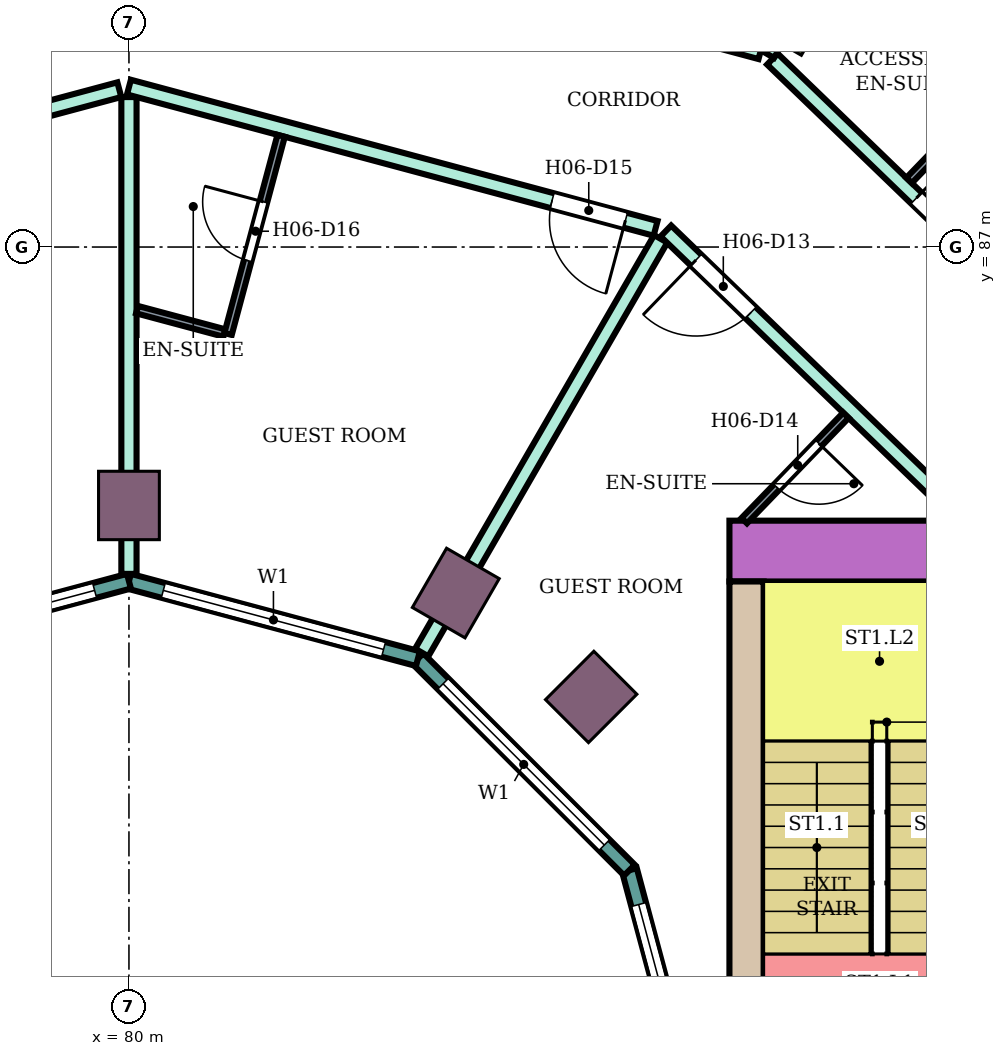
"""IFC4 building model, lengths in metres.
Left out: names, types, materials, properties, quantities, classifications, styles, units other than length and angle.
Written with IfcOpenShell. Run it as: python <this file> out.ifc"""

import sys

from ifc_helpers import new_model, si_unit, direction, frame, frame_2d, origin, origin_2d, place, context, subcontext, project, spatial, rectangle, extrude, element, fill, save


model = new_model("IFC4")
c1 = context("Model", 3, precision=1e-05, world=origin(), true_north=direction((0.0, 1.0)))
c2 = subcontext(c1, "Body", "Model", "MODEL_VIEW")
j1 = project(units=[si_unit("LENGTHUNIT", "METRE"), si_unit("PLANEANGLEUNIT", "RADIAN")], contexts=[c1])
p1 = place(None, origin())
s1 = spatial("IfcSite", under=j1, at=p1, CompositionType="ELEMENT")
p2 = place(p1, origin())
s2 = spatial("IfcBuilding", under=s1, at=p2, CompositionType="ELEMENT")
p3 = place(p2, frame((0.0, 0.0, 97.6)))
s3 = spatial("IfcBuildingStorey", under=s2, at=p3, CompositionType="ELEMENT", Elevation=97.6)
p4 = place(p3, frame((88.8, 90.242, 0.0), z_axis=(0.0, 0.0, 1.0), x_axis=(0.5, 0.866025403784, 0.0)))
e1 = element("IfcColumn", 1, at=p4, inside=s3, PredefinedType="COLUMN", context=c2, shape_type="SweptSolid", body=[
    extrude(rectangle(XDim=1.2, YDim=0.8, at=origin_2d()), origin(), (0.0, 0.0, 1.0), 3.8),
])
for number, where, z_axis, x_axis in (
    (2, (86.081, 81.081, 0.0), (0.0, 0.0, 1.0), (0.707, 0.707, 0.0)),
    (3, (84.3, 82.448, 0.0), (0.0, 0.0, 1.0), (0.5, 0.866, 0.0)),
    (4, (80.0, 83.6, 0.0), (0.0, 0.0, 1.0), (0.0, 1.0, 0.0)),
):
    element("IfcColumn", number, at=place(p3, frame(where, z_axis=z_axis, x_axis=x_axis)), inside=s3, PredefinedType="COLUMN", context=c2, shape_type="SweptSolid", body=[
        extrude(rectangle(XDim=0.9, YDim=0.8, at=origin_2d()), origin(), (0.0, 0.0, 1.0), 3.8),
    ])
p5 = place(p3, frame((87.9, 83.0, 0.0), z_axis=(0.0, 0.0, 1.0), x_axis=(1.0, 0.0, 0.0)))
e5 = element("IfcWall", 5, at=p5, inside=s3, PredefinedType="SHEAR", context=c2, shape_type="SweptSolid", body=[
    extrude(rectangle(XDim=14.7, YDim=0.8, at=frame_2d((7.35, 0.0))), origin(), (0.0, 0.0, 1.0), 3.48),
])
p6 = place(p5, frame((4.2, 0.0, 0.0)))
e6 = element("IfcOpeningElement", 6, at=p6, cuts=e5, PredefinedType="OPENING", context=c2, shape_type="SweptSolid", body=[
    extrude(rectangle(XDim=2.4, YDim=2.4, at=frame_2d((1.2, 1.2))), frame((0.0, 0.41, 0.0), z_axis=(0.0, -1.0, 0.0), x_axis=(1.0, 0.0, 0.0)), (0.0, 0.0, 1.0), 0.82),
])
p7 = place(p3, frame((88.125, 75.0, 0.0), z_axis=(0.0, 0.0, 1.0), x_axis=(0.0, 1.0, 0.0)))
e7 = element("IfcWall", 7, at=p7, inside=s3, PredefinedType="SHEAR", context=c2, shape_type="SweptSolid", body=[
    extrude(rectangle(XDim=7.6, YDim=0.45, at=frame_2d((3.8, 0.0))), origin(), (0.0, 0.0, 1.0), 3.48),
])
p8 = place(p3, frame((87.604, 75.0, 0.0), z_axis=(0.0, 0.0, 1.0), x_axis=(-0.258789828301, 0.965933654434, 0.0)))
e8 = element("IfcWall", 8, at=p8, inside=s3, PredefinedType="NOTDEFINED", context=c2, shape_type="SweptSolid", body=[
    extrude(rectangle(XDim=3.936, YDim=0.2, at=frame_2d((1.968, 0.0))), origin(), (0.0, 0.0, 1.0), 3.8),
])
p9 = place(p8, frame((0.468, 0.0, 0.9)))
e9 = element("IfcOpeningElement", 9, at=p9, cuts=e8, PredefinedType="OPENING", context=c2, shape_type="SweptSolid", body=[
    extrude(rectangle(XDim=3.0, YDim=2.3, at=frame_2d((1.5, 1.15))), frame((0.0, 0.11, 0.0), z_axis=(0.0, -1.0, 0.0), x_axis=(1.0, 0.0, 0.0)), (0.0, 0.0, 1.0), 0.22),
])
p10 = place(p3, frame((86.585, 78.802, 0.0), z_axis=(0.0, 0.0, 1.0), x_axis=(-0.707106781187, 0.707106781187, 0.0)))
e10 = element("IfcWall", 10, at=p10, inside=s3, PredefinedType="NOTDEFINED", context=c2, shape_type="SweptSolid", body=[
    extrude(rectangle(XDim=3.936, YDim=0.2, at=frame_2d((1.968, 0.0))), origin(), (0.0, 0.0, 1.0), 3.8),
])
p11 = place(p10, frame((0.468, 0.0, 0.9)))
e11 = element("IfcOpeningElement", 11, at=p11, cuts=e10, PredefinedType="OPENING", context=c2, shape_type="SweptSolid", body=[
    extrude(rectangle(XDim=3.0, YDim=2.3, at=frame_2d((1.5, 1.15))), frame((0.0, 0.11, 0.0), z_axis=(0.0, -1.0, 0.0), x_axis=(1.0, 0.0, 0.0)), (0.0, 0.0, 1.0), 0.22),
])
p12 = place(p3, frame((83.802, 81.585, 0.0), z_axis=(0.0, 0.0, 1.0), x_axis=(-0.965933654434, 0.258789828301, 0.0)))
e12 = element("IfcWall", 12, at=p12, inside=s3, PredefinedType="NOTDEFINED", context=c2, shape_type="SweptSolid", body=[
    extrude(rectangle(XDim=3.936, YDim=0.2, at=frame_2d((1.968, 0.0))), origin(), (0.0, 0.0, 1.0), 3.8),
])
p13 = place(p12, frame((0.468, 0.0, 0.9)))
e13 = element("IfcOpeningElement", 13, at=p13, cuts=e12, PredefinedType="OPENING", context=c2, shape_type="SweptSolid", body=[
    extrude(rectangle(XDim=3.0, YDim=2.3, at=frame_2d((1.5, 1.15))), frame((0.0, 0.11, 0.0), z_axis=(0.0, -1.0, 0.0), x_axis=(1.0, 0.0, 0.0)), (0.0, 0.0, 1.0), 0.22),
])
p14 = place(p3, frame((80.0, 82.604, 0.0), z_axis=(0.0, 0.0, 1.0), x_axis=(-0.965933654434, -0.258789828301, 0.0)))
e14 = element("IfcWall", 14, at=p14, inside=s3, PredefinedType="NOTDEFINED", context=c2, shape_type="SweptSolid", body=[
    extrude(rectangle(XDim=3.936, YDim=0.2, at=frame_2d((1.968, 0.0))), origin(), (0.0, 0.0, 1.0), 3.8),
])
p15 = place(p14, frame((0.468, 0.0, 0.9)))
e15 = element("IfcOpeningElement", 15, at=p15, cuts=e14, PredefinedType="OPENING", context=c2, shape_type="SweptSolid", body=[
    extrude(rectangle(XDim=3.0, YDim=2.3, at=frame_2d((1.5, 1.15))), frame((0.0, 0.11, 0.0), z_axis=(0.0, -1.0, 0.0), x_axis=(1.0, 0.0, 0.0)), (0.0, 0.0, 1.0), 0.22),
])
p16 = place(p3, frame((71.614, 89.55, 0.0), z_axis=(0.0, 0.0, 1.0), x_axis=(0.965982378603, 0.258607896685, 0.0)))
e16 = element("IfcWall", 16, at=p16, inside=s3, PredefinedType="PARTITIONING", context=c2, shape_type="SweptSolid", body=[
    extrude(rectangle(XDim=8.632, YDim=0.2, at=frame_2d((4.316, 0.0))), origin(), (0.0, 0.0, 1.0), 3.35),
])
p17 = place(p16, frame((2.804, 0.0, 0.0)))
e17 = element("IfcOpeningElement", 17, at=p17, cuts=e16, PredefinedType="OPENING", context=c2, shape_type="SweptSolid", body=[
    extrude(rectangle(XDim=1.0, YDim=2.1, at=frame_2d((0.5, 1.05))), frame((0.0, 0.11, 0.0), z_axis=(0.0, -1.0, 0.0), x_axis=(1.0, 0.0, 0.0)), (0.0, 0.0, 1.0), 0.22),
])
p18 = place(p3, frame((72.936, 87.211, 0.0), z_axis=(0.0, 0.0, 1.0), x_axis=(0.965917703859, 0.258849356521, 0.0)))
e18 = element("IfcWall", 18, at=p18, inside=s3, PredefinedType="PARTITIONING", context=c2, shape_type="SweptSolid", body=[
    extrude(rectangle(XDim=7.182, YDim=0.2, at=frame_2d((3.591, 0.0))), origin(), (0.0, 0.0, 1.0), 3.35),
])
p19 = place(p18, frame((2.757, 0.0, 0.0)))
e19 = element("IfcOpeningElement", 19, at=p19, cuts=e18, PredefinedType="OPENING", context=c2, shape_type="SweptSolid", body=[
    extrude(rectangle(XDim=1.8, YDim=2.1, at=frame_2d((0.9, 1.05))), frame((0.0, 0.11, 0.0), z_axis=(0.0, -1.0, 0.0), x_axis=(1.0, 0.0, 0.0)), (0.0, 0.0, 1.0), 0.22),
])
p20 = place(p3, frame((80.0, 82.7, 0.0), z_axis=(0.0, 0.0, 1.0), x_axis=(0.0, 1.0, 0.0)))
e20 = element("IfcWall", 20, at=p20, inside=s3, PredefinedType="PARTITIONING", context=c2, shape_type="SweptSolid", body=[
    extrude(rectangle(XDim=6.273, YDim=0.2, at=frame_2d((3.136, 0.0))), origin(), (0.0, 0.0, 1.0), 3.35),
])
p21 = place(p3, frame((80.0, 89.104, 0.0), z_axis=(0.0, 0.0, 1.0), x_axis=(0.965856548257, -0.259077455964, 0.0)))
e21 = element("IfcWall", 21, at=p21, inside=s3, PredefinedType="PARTITIONING", context=c2, shape_type="SweptSolid", body=[
    extrude(rectangle(XDim=7.173, YDim=0.2, at=frame_2d((3.586, 0.0))), origin(), (0.0, 0.0, 1.0), 3.35),
])
p22 = place(p21, frame((5.763, 0.0, 0.0)))
e22 = element("IfcOpeningElement", 22, at=p22, cuts=e21, PredefinedType="OPENING", context=c2, shape_type="SweptSolid", body=[
    extrude(rectangle(XDim=1.0, YDim=2.1, at=frame_2d((0.5, 1.05))), frame((0.0, 0.11, 0.0), z_axis=(0.0, -1.0, 0.0), x_axis=(1.0, 0.0, 0.0)), (0.0, 0.0, 1.0), 0.22),
])
p23 = place(p3, frame((80.0, 91.796, 0.0), z_axis=(0.0, 0.0, 1.0), x_axis=(0.965917643923, -0.258849580177, 0.0)))
e23 = element("IfcWall", 23, at=p23, inside=s3, PredefinedType="PARTITIONING", context=c2, shape_type="SweptSolid", body=[
    extrude(rectangle(XDim=8.602, YDim=0.2, at=frame_2d((4.301, 0.0))), origin(), (0.0, 0.0, 1.0), 3.35),
])
p24 = place(p23, frame((2.091, 0.0, 0.0)))
e24 = element("IfcOpeningElement", 24, at=p24, cuts=e23, PredefinedType="OPENING", context=c2, shape_type="SweptSolid", body=[
    extrude(rectangle(XDim=1.8, YDim=2.1, at=frame_2d((0.9, 1.05))), frame((0.0, 0.11, 0.0), z_axis=(0.0, -1.0, 0.0), x_axis=(1.0, 0.0, 0.0)), (0.0, 0.0, 1.0), 0.22),
])
p25 = place(p3, frame((83.852, 81.665, 0.0), z_axis=(0.0, 0.0, 1.0), x_axis=(0.500236829077, 0.86588862727, 0.0)))
e25 = element("IfcWall", 25, at=p25, inside=s3, PredefinedType="PARTITIONING", context=c2, shape_type="SweptSolid", body=[
    extrude(rectangle(XDim=6.286, YDim=0.2, at=frame_2d((3.143, 0.0))), origin(), (0.0, 0.0, 1.0), 3.35),
])
p26 = place(p3, frame((87.064, 87.211, 0.0), z_axis=(0.0, 0.0, 1.0), x_axis=(0.719540958932, -0.694450004262, 0.0)))
e26 = element("IfcWall", 26, at=p26, inside=s3, PredefinedType="PARTITIONING", context=c2, shape_type="SweptSolid", body=[
    extrude(rectangle(XDim=5.488, YDim=0.2, at=frame_2d((2.744, 0.0))), origin(), (0.0, 0.0, 1.0), 3.35),
])
p27 = place(p26, frame((0.55, 0.0, 0.0)))
e27 = element("IfcOpeningElement", 27, at=p27, cuts=e26, PredefinedType="OPENING", context=c2, shape_type="SweptSolid", body=[
    extrude(rectangle(XDim=1.0, YDim=2.1, at=frame_2d((0.5, 1.05))), frame((0.0, 0.11, 0.0), z_axis=(0.0, -1.0, 0.0), x_axis=(1.0, 0.0, 0.0)), (0.0, 0.0, 1.0), 0.22),
])
p28 = place(p3, frame((88.465, 89.473, 0.0), z_axis=(0.0, 0.0, 1.0), x_axis=(0.719474304909, -0.694519059908, 0.0)))
e28 = element("IfcWall", 28, at=p28, inside=s3, PredefinedType="PARTITIONING", context=c2, shape_type="SweptSolid", body=[
    extrude(rectangle(XDim=6.525, YDim=0.2, at=frame_2d((3.263, 0.0))), origin(), (0.0, 0.0, 1.0), 3.35),
])
p29 = place(p28, frame((2.633, 0.0, 0.0)))
e29 = element("IfcOpeningElement", 29, at=p29, cuts=e28, PredefinedType="OPENING", context=c2, shape_type="SweptSolid", body=[
    extrude(rectangle(XDim=1.1, YDim=2.1, at=frame_2d((0.55, 1.05))), frame((0.0, 0.11, 0.0), z_axis=(0.0, -1.0, 0.0), x_axis=(1.0, 0.0, 0.0)), (0.0, 0.0, 1.0), 0.22),
])
p30 = place(p3, frame((88.4, 89.538, 0.0), z_axis=(0.0, 0.0, 1.0), x_axis=(0.500234695877, 0.865889859648, 0.0)))
e30 = element("IfcWall", 30, at=p30, inside=s3, PredefinedType="PARTITIONING", context=c2, shape_type="SweptSolid", body=[
    extrude(rectangle(XDim=9.007, YDim=0.2, at=frame_2d((4.503, 0.0))), origin(), (0.0, 0.0, 1.0), 3.35),
])
p31 = place(p3, frame((80.106, 86.177, 0.0), z_axis=(0.0, 0.0, 1.0), x_axis=(0.966002973184, -0.258530957139, 0.0)))
e31 = element("IfcWall", 31, at=p31, inside=s3, PredefinedType="PARTITIONING", context=c2, shape_type="SweptSolid", body=[
    extrude(rectangle(XDim=1.19, YDim=0.1, at=frame_2d((0.595, 0.0))), origin(), (0.0, 0.0, 1.0), 3.35),
])
p32 = place(p3, frame((81.304, 85.856, 0.0), z_axis=(0.0, 0.0, 1.0), x_axis=(0.25867580527, 0.965964195904, 0.0)))
e32 = element("IfcWall", 32, at=p32, inside=s3, PredefinedType="PARTITIONING", context=c2, shape_type="SweptSolid", body=[
    extrude(rectangle(XDim=2.699, YDim=0.1, at=frame_2d((1.35, 0.0))), origin(), (0.0, 0.0, 1.0), 3.35),
])
p33 = place(p32, frame((1.0, 0.0, 0.0)))
e33 = element("IfcOpeningElement", 33, at=p33, cuts=e32, PredefinedType="OPENING", context=c2, shape_type="SweptSolid", body=[
    extrude(rectangle(XDim=0.8, YDim=2.1, at=frame_2d((0.4, 1.05))), frame((0.0, 0.06, 0.0), z_axis=(0.0, -1.0, 0.0), x_axis=(1.0, 0.0, 0.0)), (0.0, 0.0, 1.0), 0.12),
])
p34 = place(p3, frame((88.095, 83.4, 0.0), z_axis=(0.0, 0.0, 1.0), x_axis=(0.694447472534, 0.719543402368, 0.0)))
e34 = element("IfcWall", 34, at=p34, inside=s3, PredefinedType="PARTITIONING", context=c2, shape_type="SweptSolid", body=[
    extrude(rectangle(XDim=1.926, YDim=0.1, at=frame_2d((0.963, 0.0))), origin(), (0.0, 0.0, 1.0), 3.35),
])
p35 = place(p34, frame((0.613, 0.0, 0.0)))
e35 = element("IfcOpeningElement", 35, at=p35, cuts=e34, PredefinedType="OPENING", context=c2, shape_type="SweptSolid", body=[
    extrude(rectangle(XDim=0.8, YDim=2.1, at=frame_2d((0.4, 1.05))), frame((0.0, 0.06, 0.0), z_axis=(0.0, -1.0, 0.0), x_axis=(1.0, 0.0, 0.0)), (0.0, 0.0, 1.0), 0.12),
])
p36 = place(p3, frame((90.263, 87.876, 0.0), z_axis=(0.0, 0.0, 1.0), x_axis=(0.694534400859, 0.719459495749, 0.0)))
e36 = element("IfcWall", 36, at=p36, inside=s3, PredefinedType="PARTITIONING", context=c2, shape_type="SweptSolid", body=[
    extrude(rectangle(XDim=2.899, YDim=0.1, at=frame_2d((1.45, 0.0))), origin(), (0.0, 0.0, 1.0), 3.35),
])
p37 = place(p9, origin())
e37 = element("IfcWindow", 37, at=p37, inside=s3, PartitioningType="SINGLE_PANEL", PredefinedType="WINDOW", context=c2, shape_type="SweptSolid", body=[
    extrude(rectangle(XDim=3.0, YDim=2.3, at=frame_2d((1.5, 1.15))), frame((0.0, 0.03, 0.0), z_axis=(0.0, -1.0, 0.0), x_axis=(1.0, 0.0, 0.0)), (0.0, 0.0, 1.0), 0.06),
])
fill(e9, e37)
p38 = place(p11, origin())
e38 = element("IfcWindow", 38, at=p38, inside=s3, PartitioningType="SINGLE_PANEL", PredefinedType="WINDOW", context=c2, shape_type="SweptSolid", body=[
    extrude(rectangle(XDim=3.0, YDim=2.3, at=frame_2d((1.5, 1.15))), frame((0.0, 0.03, 0.0), z_axis=(0.0, -1.0, 0.0), x_axis=(1.0, 0.0, 0.0)), (0.0, 0.0, 1.0), 0.06),
])
fill(e11, e38)
p39 = place(p13, origin())
e39 = element("IfcWindow", 39, at=p39, inside=s3, PartitioningType="SINGLE_PANEL", PredefinedType="WINDOW", context=c2, shape_type="SweptSolid", body=[
    extrude(rectangle(XDim=3.0, YDim=2.3, at=frame_2d((1.5, 1.15))), frame((0.0, 0.03, 0.0), z_axis=(0.0, -1.0, 0.0), x_axis=(1.0, 0.0, 0.0)), (0.0, 0.0, 1.0), 0.06),
])
fill(e13, e39)
p40 = place(p15, origin())
e40 = element("IfcWindow", 40, at=p40, inside=s3, PartitioningType="SINGLE_PANEL", PredefinedType="WINDOW", context=c2, shape_type="SweptSolid", body=[
    extrude(rectangle(XDim=3.0, YDim=2.3, at=frame_2d((1.5, 1.15))), frame((0.0, 0.03, 0.0), z_axis=(0.0, -1.0, 0.0), x_axis=(1.0, 0.0, 0.0)), (0.0, 0.0, 1.0), 0.06),
])
fill(e15, e40)
p41 = place(p29, origin())
e41 = element("IfcDoor", 41, at=p41, inside=s3, OperationType="SINGLE_SWING_LEFT", PredefinedType="DOOR", context=c2, shape_type="SweptSolid", body=[
    extrude(rectangle(XDim=1.1, YDim=2.1, at=frame_2d((0.55, 1.05))), frame((0.0, 0.025, 0.0), z_axis=(0.0, -1.0, 0.0), x_axis=(1.0, 0.0, 0.0)), (0.0, 0.0, 1.0), 0.05),
])
fill(e29, e41)
p42 = place(p27, frame((1.0, 0.0, 0.0), z_axis=(0.0, 0.0, 1.0), x_axis=(-1.0, 0.0, 0.0)))
e42 = element("IfcDoor", 42, at=p42, inside=s3, OperationType="SINGLE_SWING_RIGHT", PredefinedType="DOOR", context=c2, shape_type="SweptSolid", body=[
    extrude(rectangle(XDim=1.0, YDim=2.1, at=frame_2d((0.5, 1.05))), frame((0.0, 0.025, 0.0), z_axis=(0.0, -1.0, 0.0), x_axis=(1.0, 0.0, 0.0)), (0.0, 0.0, 1.0), 0.05),
])
fill(e27, e42)
p43 = place(p35, frame((0.8, 0.0, 0.0), z_axis=(0.0, 0.0, 1.0), x_axis=(-1.0, 0.0, 0.0)))
e43 = element("IfcDoor", 43, at=p43, inside=s3, OperationType="SINGLE_SWING_LEFT", PredefinedType="DOOR", context=c2, shape_type="SweptSolid", body=[
    extrude(rectangle(XDim=0.8, YDim=2.1, at=frame_2d((0.4, 1.05))), frame((0.0, 0.025, 0.0), z_axis=(0.0, -1.0, 0.0), x_axis=(1.0, 0.0, 0.0)), (0.0, 0.0, 1.0), 0.05),
])
fill(e35, e43)
p44 = place(p22, frame((1.0, 0.0, 0.0), z_axis=(0.0, 0.0, 1.0), x_axis=(-1.0, 0.0, 0.0)))
e44 = element("IfcDoor", 44, at=p44, inside=s3, OperationType="SINGLE_SWING_LEFT", PredefinedType="DOOR", context=c2, shape_type="SweptSolid", body=[
    extrude(rectangle(XDim=1.0, YDim=2.1, at=frame_2d((0.5, 1.05))), frame((0.0, 0.025, 0.0), z_axis=(0.0, -1.0, 0.0), x_axis=(1.0, 0.0, 0.0)), (0.0, 0.0, 1.0), 0.05),
])
fill(e22, e44)
p45 = place(p33, origin())
e45 = element("IfcDoor", 45, at=p45, inside=s3, OperationType="SINGLE_SWING_RIGHT", PredefinedType="DOOR", context=c2, shape_type="SweptSolid", body=[
    extrude(rectangle(XDim=0.8, YDim=2.1, at=frame_2d((0.4, 1.05))), frame((0.0, 0.025, 0.0), z_axis=(0.0, -1.0, 0.0), x_axis=(1.0, 0.0, 0.0)), (0.0, 0.0, 1.0), 0.05),
])
fill(e33, e45)
save(model, sys.argv[1])
